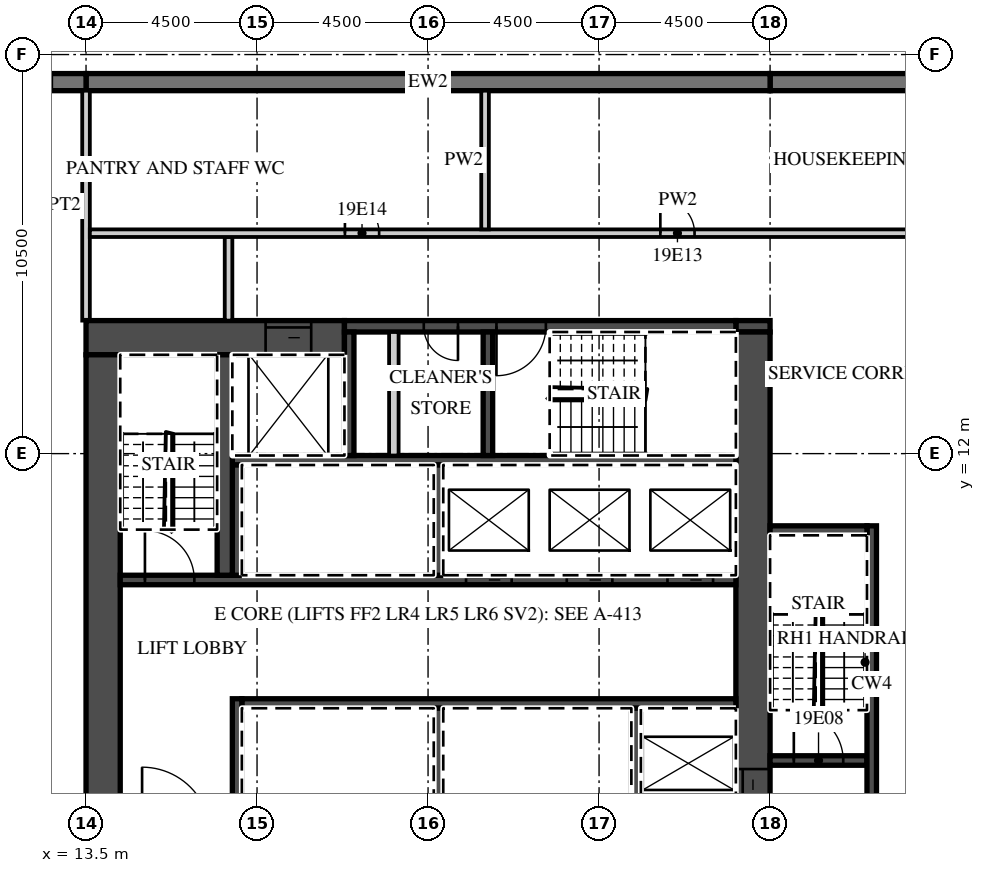
"""IFC4 building model, lengths in metres.
Left out: names, types, materials, properties, quantities, classifications, styles, units other than length and angle.
Written with IfcOpenShell. Run it as: python <this file> out.ifc"""

import sys

from ifc_helpers import new_model, si_unit, direction, frame, frame_2d, origin, place, context, subcontext, project, spatial, rectangle, extrude, element, fill, save


model = new_model("IFC4")
c1 = context("Model", 3, precision=1e-05, world=origin(), true_north=direction((0.0, 1.0)))
c2 = subcontext(c1, "Body", "Model", "MODEL_VIEW")
j1 = project(units=[si_unit("LENGTHUNIT", "METRE"), si_unit("PLANEANGLEUNIT", "RADIAN")], contexts=[c1])
p1 = place(None, origin())
s1 = spatial("IfcSite", under=j1, at=p1, CompositionType="ELEMENT")
p2 = place(p1, origin())
s2 = spatial("IfcBuilding", under=s1, at=p2, CompositionType="ELEMENT")
p3 = place(p2, frame((0.0, 0.0, 93.0)))
s3 = spatial("IfcBuildingStorey", under=s2, at=p3, CompositionType="ELEMENT", Elevation=93.0)
p4 = place(p3, frame((41.0, 21.775, 0.0), z_axis=(0.0, 0.0, 1.0), x_axis=(-1.0, 0.0, 0.0)))
e1 = element("IfcWall", 1, at=p4, inside=s3, PredefinedType="SOLIDWALL", context=c2, shape_type="SweptSolid", body=[
    extrude(rectangle(XDim=9.5, YDim=0.45, at=frame_2d((4.75, 0.0))), origin(), (0.0, 0.0, 1.0), 3.02),
])
p5 = place(p3, frame((31.5, 21.775, 0.0), z_axis=(0.0, 0.0, 1.0), x_axis=(-1.0, 0.0, 0.0)))
e2 = element("IfcWall", 2, at=p5, inside=s3, PredefinedType="SOLIDWALL", context=c2, shape_type="SweptSolid", body=[
    extrude(rectangle(XDim=18.0, YDim=0.45, at=frame_2d((9.0, 0.0))), origin(), (0.0, 0.0, 1.0), 3.02),
])
p6 = place(p3, frame((13.5, 21.775, 0.0), z_axis=(0.0, 0.0, 1.0), x_axis=(-1.0, 0.0, 0.0)))
e3 = element("IfcWall", 3, at=p6, inside=s3, PredefinedType="SOLIDWALL", context=c2, shape_type="SweptSolid", body=[
    extrude(rectangle(XDim=54.5, YDim=0.45, at=frame_2d((27.25, 0.0))), origin(), (0.0, 0.0, 1.0), 3.02),
])
p7 = place(p6, frame((0.9, 0.0, 0.45)))
e4 = element("IfcOpeningElement", 4, at=p7, cuts=e3, PredefinedType="OPENING", context=c2, shape_type="SweptSolid", body=[
    extrude(rectangle(XDim=2.7, YDim=2.25, at=frame_2d((1.35, 1.125))), frame((0.0, 0.235, 0.0), z_axis=(0.0, -1.0, 0.0), x_axis=(1.0, 0.0, 0.0)), (0.0, 0.0, 1.0), 0.47),
])
p8 = place(p6, frame((5.4, 0.0, 0.45)))
e5 = element("IfcOpeningElement", 5, at=p8, cuts=e3, PredefinedType="OPENING", context=c2, shape_type="SweptSolid", body=[
    extrude(rectangle(XDim=2.7, YDim=2.25, at=frame_2d((1.35, 1.125))), frame((0.0, 0.235, 0.0), z_axis=(0.0, -1.0, 0.0), x_axis=(1.0, 0.0, 0.0)), (0.0, 0.0, 1.0), 0.47),
])
p9 = place(p6, frame((9.9, 0.0, 0.45)))
e6 = element("IfcOpeningElement", 6, at=p9, cuts=e3, PredefinedType="OPENING", context=c2, shape_type="SweptSolid", body=[
    extrude(rectangle(XDim=2.7, YDim=2.25, at=frame_2d((1.35, 1.125))), frame((0.0, 0.235, 0.0), z_axis=(0.0, -1.0, 0.0), x_axis=(1.0, 0.0, 0.0)), (0.0, 0.0, 1.0), 0.47),
])
p10 = place(p6, frame((14.4, 0.0, 0.45)))
e7 = element("IfcOpeningElement", 7, at=p10, cuts=e3, PredefinedType="OPENING", context=c2, shape_type="SweptSolid", body=[
    extrude(rectangle(XDim=2.7, YDim=2.25, at=frame_2d((1.35, 1.125))), frame((0.0, 0.235, 0.0), z_axis=(0.0, -1.0, 0.0), x_axis=(1.0, 0.0, 0.0)), (0.0, 0.0, 1.0), 0.47),
])
p11 = place(p6, frame((18.9, 0.0, 0.45)))
e8 = element("IfcOpeningElement", 8, at=p11, cuts=e3, PredefinedType="OPENING", context=c2, shape_type="SweptSolid", body=[
    extrude(rectangle(XDim=2.7, YDim=2.25, at=frame_2d((1.35, 1.125))), frame((0.0, 0.235, 0.0), z_axis=(0.0, -1.0, 0.0), x_axis=(1.0, 0.0, 0.0)), (0.0, 0.0, 1.0), 0.47),
])
p12 = place(p6, frame((23.4, 0.0, 0.45)))
e9 = element("IfcOpeningElement", 9, at=p12, cuts=e3, PredefinedType="OPENING", context=c2, shape_type="SweptSolid", body=[
    extrude(rectangle(XDim=2.7, YDim=2.25, at=frame_2d((1.35, 1.125))), frame((0.0, 0.235, 0.0), z_axis=(0.0, -1.0, 0.0), x_axis=(1.0, 0.0, 0.0)), (0.0, 0.0, 1.0), 0.47),
])
p13 = place(p6, frame((27.9, 0.0, 0.45)))
e10 = element("IfcOpeningElement", 10, at=p13, cuts=e3, PredefinedType="OPENING", context=c2, shape_type="SweptSolid", body=[
    extrude(rectangle(XDim=2.7, YDim=2.25, at=frame_2d((1.35, 1.125))), frame((0.0, 0.235, 0.0), z_axis=(0.0, -1.0, 0.0), x_axis=(1.0, 0.0, 0.0)), (0.0, 0.0, 1.0), 0.47),
])
p14 = place(p6, frame((32.4, 0.0, 0.45)))
e11 = element("IfcOpeningElement", 11, at=p14, cuts=e3, PredefinedType="OPENING", context=c2, shape_type="SweptSolid", body=[
    extrude(rectangle(XDim=2.7, YDim=2.25, at=frame_2d((1.35, 1.125))), frame((0.0, 0.235, 0.0), z_axis=(0.0, -1.0, 0.0), x_axis=(1.0, 0.0, 0.0)), (0.0, 0.0, 1.0), 0.47),
])
p15 = place(p6, frame((36.9, 0.0, 0.45)))
e12 = element("IfcOpeningElement", 12, at=p15, cuts=e3, PredefinedType="OPENING", context=c2, shape_type="SweptSolid", body=[
    extrude(rectangle(XDim=2.7, YDim=2.25, at=frame_2d((1.35, 1.125))), frame((0.0, 0.235, 0.0), z_axis=(0.0, -1.0, 0.0), x_axis=(1.0, 0.0, 0.0)), (0.0, 0.0, 1.0), 0.47),
])
p16 = place(p6, frame((41.4, 0.0, 0.45)))
e13 = element("IfcOpeningElement", 13, at=p16, cuts=e3, PredefinedType="OPENING", context=c2, shape_type="SweptSolid", body=[
    extrude(rectangle(XDim=2.7, YDim=2.25, at=frame_2d((1.35, 1.125))), frame((0.0, 0.235, 0.0), z_axis=(0.0, -1.0, 0.0), x_axis=(1.0, 0.0, 0.0)), (0.0, 0.0, 1.0), 0.47),
])
p17 = place(p6, frame((45.9, 0.0, 0.45)))
e14 = element("IfcOpeningElement", 14, at=p17, cuts=e3, PredefinedType="OPENING", context=c2, shape_type="SweptSolid", body=[
    extrude(rectangle(XDim=2.7, YDim=2.25, at=frame_2d((1.35, 1.125))), frame((0.0, 0.235, 0.0), z_axis=(0.0, -1.0, 0.0), x_axis=(1.0, 0.0, 0.0)), (0.0, 0.0, 1.0), 0.47),
])
p18 = place(p6, frame((50.4, 0.0, 0.45)))
e15 = element("IfcOpeningElement", 15, at=p18, cuts=e3, PredefinedType="OPENING", context=c2, shape_type="SweptSolid", body=[
    extrude(rectangle(XDim=2.7, YDim=2.25, at=frame_2d((1.35, 1.125))), frame((0.0, 0.235, 0.0), z_axis=(0.0, -1.0, 0.0), x_axis=(1.0, 0.0, 0.0)), (0.0, 0.0, 1.0), 0.47),
])
p19 = place(p3, frame((13.5, 15.5, 0.0), z_axis=(0.0, 0.0, 1.0), x_axis=(0.0, 1.0, 0.0)))
e16 = element("IfcWall", 16, at=p19, inside=s3, PredefinedType="PARTITIONING", context=c2, shape_type="SweptSolid", body=[
    extrude(rectangle(XDim=6.05, YDim=0.2, at=frame_2d((3.025, 0.0))), origin(), (0.0, 0.0, 1.0), 3.02),
])
p20 = place(p3, frame((13.5, 15.05, 0.0), z_axis=(0.0, 0.0, 1.0), x_axis=(1.0, 0.0, 0.0)))
e17 = element("IfcWall", 17, at=p20, inside=s3, PredefinedType="SHEAR", context=c2, shape_type="SweptSolid", body=[
    extrude(rectangle(XDim=6.8, YDim=0.9, at=frame_2d((3.4, 0.0))), origin(), (0.0, 0.0, 1.0), 3.02),
])
p21 = place(p20, frame((4.725, 0.0, 0.0)))
e18 = element("IfcOpeningElement", 18, at=p21, cuts=e17, PredefinedType="OPENING", context=c2, shape_type="SweptSolid", body=[
    extrude(rectangle(XDim=1.2, YDim=2.1, at=frame_2d((0.6, 1.05))), frame((0.0, 0.46, 0.0), z_axis=(0.0, -1.0, 0.0), x_axis=(1.0, 0.0, 0.0)), (0.0, 0.0, 1.0), 0.92),
])
p22 = place(p3, frame((30.6, 15.35, 0.0), z_axis=(0.0, 0.0, 1.0), x_axis=(1.0, 0.0, 0.0)))
e19 = element("IfcWall", 19, at=p22, inside=s3, PredefinedType="SHEAR", context=c2, shape_type="SweptSolid", body=[
    extrude(rectangle(XDim=0.9, YDim=0.3, at=frame_2d((0.45, 0.0))), origin(), (0.0, 0.0, 1.0), 3.02),
])
p23 = place(p3, frame((20.3, 15.35, 0.0), z_axis=(0.0, 0.0, 1.0), x_axis=(1.0, 0.0, 0.0)))
e20 = element("IfcWall", 20, at=p23, inside=s3, PredefinedType="SHEAR", context=c2, shape_type="SweptSolid", body=[
    extrude(rectangle(XDim=10.3, YDim=0.3, at=frame_2d((5.15, 0.0))), origin(), (0.0, 0.0, 1.0), 3.02),
])
p24 = place(p23, frame((4.0, 0.0, 0.0)))
e21 = element("IfcOpeningElement", 21, at=p24, cuts=e20, PredefinedType="OPENING", context=c2, shape_type="SweptSolid", body=[
    extrude(rectangle(XDim=1.3, YDim=2.1, at=frame_2d((0.65, 1.05))), frame((0.0, 0.16, 0.0), z_axis=(0.0, -1.0, 0.0), x_axis=(1.0, 0.0, 0.0)), (0.0, 0.0, 1.0), 0.32),
])
p25 = place(p23, frame((2.087, 0.0, 0.0)))
e22 = element("IfcOpeningElement", 22, at=p25, cuts=e20, PredefinedType="OPENING", context=c2, shape_type="SweptSolid", body=[
    extrude(rectangle(XDim=0.9, YDim=2.1, at=frame_2d((0.45, 1.05))), frame((0.0, 0.16, 0.0), z_axis=(0.0, -1.0, 0.0), x_axis=(1.0, 0.0, 0.0)), (0.0, 0.0, 1.0), 0.32),
])
p26 = place(p3, frame((31.05, 2.4, 0.0), z_axis=(0.0, 0.0, 1.0), x_axis=(0.0, 1.0, 0.0)))
e23 = element("IfcWall", 23, at=p26, inside=s3, PredefinedType="SHEAR", context=c2, shape_type="SweptSolid", body=[
    extrude(rectangle(XDim=12.8, YDim=0.9, at=frame_2d((6.4, 0.0))), origin(), (0.0, 0.0, 1.0), 3.02),
])
p27 = place(p26, frame((0.2, 0.0, 0.0)))
e24 = element("IfcOpeningElement", 24, at=p27, cuts=e23, PredefinedType="OPENING", context=c2, shape_type="SweptSolid", body=[
    extrude(rectangle(XDim=1.1, YDim=2.1, at=frame_2d((0.55, 1.05))), frame((0.0, 0.46, 0.0), z_axis=(0.0, -1.0, 0.0), x_axis=(1.0, 0.0, 0.0)), (0.0, 0.0, 1.0), 0.92),
])
p28 = place(p3, frame((13.95, 2.4, 0.0), z_axis=(0.0, 0.0, 1.0), x_axis=(0.0, 1.0, 0.0)))
e25 = element("IfcWall", 25, at=p28, inside=s3, PredefinedType="SHEAR", context=c2, shape_type="SweptSolid", body=[
    extrude(rectangle(XDim=12.2, YDim=0.9, at=frame_2d((6.1, 0.0))), origin(), (0.0, 0.0, 1.0), 3.02),
])
p29 = place(p3, frame((17.6, 5.425, 0.0), z_axis=(0.0, 0.0, 1.0), x_axis=(1.0, 0.0, 0.0)))
e26 = element("IfcWall", 26, at=p29, inside=s3, PredefinedType="SHEAR", context=c2, shape_type="SweptSolid", body=[
    extrude(rectangle(XDim=13.0, YDim=0.25, at=frame_2d((6.5, 0.0))), origin(), (0.0, 0.0, 1.0), 3.02),
])
p30 = place(p3, frame((17.475, 2.4, 0.0), z_axis=(0.0, 0.0, 1.0), x_axis=(0.0, 1.0, 0.0)))
e27 = element("IfcWall", 27, at=p30, inside=s3, PredefinedType="SHEAR", context=c2, shape_type="SweptSolid", body=[
    extrude(rectangle(XDim=3.15, YDim=0.25, at=frame_2d((1.575, 0.0))), origin(), (0.0, 0.0, 1.0), 3.02),
])
for number, where, z_axis, x_axis in (
    (28, (27.975, 2.4, 0.0), (0.0, 0.0, 1.0), (0.0, 1.0, 0.0)),
    (29, (22.775, 2.4, 0.0), (0.0, 0.0, 1.0), (0.0, 1.0, 0.0)),
):
    element("IfcWall", number, at=place(p3, frame(where, z_axis=z_axis, x_axis=x_axis)), inside=s3, PredefinedType="SHEAR", context=c2, shape_type="SweptSolid", body=[
        extrude(rectangle(XDim=2.9, YDim=0.25, at=frame_2d((1.45, 0.0))), origin(), (0.0, 0.0, 1.0), 3.02),
    ])
p31 = place(p3, frame((14.4, 8.675, 0.0), z_axis=(0.0, 0.0, 1.0), x_axis=(1.0, 0.0, 0.0)))
e30 = element("IfcWall", 30, at=p31, inside=s3, PredefinedType="SHEAR", context=c2, shape_type="SweptSolid", body=[
    extrude(rectangle(XDim=16.2, YDim=0.25, at=frame_2d((8.1, 0.0))), origin(), (0.0, 0.0, 1.0), 3.02),
])
p32 = place(p31, frame((14.4, 0.0, 0.0)))
e31 = element("IfcOpeningElement", 31, at=p32, cuts=e30, PredefinedType="OPENING", context=c2, shape_type="SweptSolid", body=[
    extrude(rectangle(XDim=1.2, YDim=2.1, at=frame_2d((0.6, 1.05))), frame((0.0, 0.135, 0.0), z_axis=(0.0, -1.0, 0.0), x_axis=(1.0, 0.0, 0.0)), (0.0, 0.0, 1.0), 0.27),
])
p33 = place(p31, frame((11.75, 0.0, 0.0)))
e32 = element("IfcOpeningElement", 32, at=p33, cuts=e30, PredefinedType="OPENING", context=c2, shape_type="SweptSolid", body=[
    extrude(rectangle(XDim=1.2, YDim=2.1, at=frame_2d((0.6, 1.05))), frame((0.0, 0.135, 0.0), z_axis=(0.0, -1.0, 0.0), x_axis=(1.0, 0.0, 0.0)), (0.0, 0.0, 1.0), 0.27),
])
p34 = place(p31, frame((9.1, 0.0, 0.0)))
e33 = element("IfcOpeningElement", 33, at=p34, cuts=e30, PredefinedType="OPENING", context=c2, shape_type="SweptSolid", body=[
    extrude(rectangle(XDim=1.2, YDim=2.1, at=frame_2d((0.6, 1.05))), frame((0.0, 0.135, 0.0), z_axis=(0.0, -1.0, 0.0), x_axis=(1.0, 0.0, 0.0)), (0.0, 0.0, 1.0), 0.27),
])
p35 = place(p31, frame((0.65, 0.0, 0.0)))
e34 = element("IfcOpeningElement", 34, at=p35, cuts=e30, PredefinedType="OPENING", context=c2, shape_type="SweptSolid", body=[
    extrude(rectangle(XDim=1.3, YDim=2.1, at=frame_2d((0.65, 1.05))), frame((0.0, 0.135, 0.0), z_axis=(0.0, -1.0, 0.0), x_axis=(1.0, 0.0, 0.0)), (0.0, 0.0, 1.0), 0.27),
])
p36 = place(p3, frame((17.35, 11.825, 0.0), z_axis=(0.0, 0.0, 1.0), x_axis=(1.0, 0.0, 0.0)))
e35 = element("IfcWall", 35, at=p36, inside=s3, PredefinedType="SHEAR", context=c2, shape_type="SweptSolid", body=[
    extrude(rectangle(XDim=13.25, YDim=0.25, at=frame_2d((6.625, 0.0))), origin(), (0.0, 0.0, 1.0), 3.02),
])
for number, where, z_axis, x_axis in (
    (36, (17.475, 8.8, 0.0), (0.0, 0.0, 1.0), (0.0, 1.0, 0.0)),
    (37, (22.775, 8.8, 0.0), (0.0, 0.0, 1.0), (0.0, 1.0, 0.0)),
):
    element("IfcWall", number, at=place(p3, frame(where, z_axis=z_axis, x_axis=x_axis)), inside=s3, PredefinedType="SHEAR", context=c2, shape_type="SweptSolid", body=[
        extrude(rectangle(XDim=2.9, YDim=0.25, at=frame_2d((1.45, 0.0))), origin(), (0.0, 0.0, 1.0), 3.02),
    ])
p37 = place(p3, frame((17.15, 8.8, 0.0), z_axis=(0.0, 0.0, 1.0), x_axis=(0.0, 1.0, 0.0)))
e38 = element("IfcWall", 38, at=p37, inside=s3, PredefinedType="SHEAR", context=c2, shape_type="SweptSolid", body=[
    extrude(rectangle(XDim=5.8, YDim=0.4, at=frame_2d((2.9, 0.0))), origin(), (0.0, 0.0, 1.0), 3.02),
])
for number, where, z_axis, x_axis in (
    (39, (20.425, 11.95, 0.0), (0.0, 0.0, 1.0), (0.0, 1.0, 0.0)),
    (40, (24.075, 11.95, 0.0), (0.0, 0.0, 1.0), (0.0, 1.0, 0.0)),
):
    element("IfcWall", number, at=place(p3, frame(where, z_axis=z_axis, x_axis=x_axis)), inside=s3, PredefinedType="SHEAR", context=c2, shape_type="SweptSolid", body=[
        extrude(rectangle(XDim=3.25, YDim=0.25, at=frame_2d((1.625, 0.0))), origin(), (0.0, 0.0, 1.0), 3.02),
    ])
p38 = place(p3, frame((21.6, 11.95, 0.0), z_axis=(0.0, 0.0, 1.0), x_axis=(0.0, 1.0, 0.0)))
e41 = element("IfcWall", 41, at=p38, inside=s3, PredefinedType="PARTITIONING", context=c2, shape_type="SweptSolid", body=[
    extrude(rectangle(XDim=3.25, YDim=0.25, at=frame_2d((1.625, 0.0))), origin(), (0.0, 0.0, 1.0), 3.02),
])
p39 = place(p3, frame((31.5, 3.925, 0.0), z_axis=(0.0, 0.0, 1.0), x_axis=(1.0, 0.0, 0.0)))
e42 = element("IfcWall", 42, at=p39, inside=s3, PredefinedType="SHEAR", context=c2, shape_type="SweptSolid", body=[
    extrude(rectangle(XDim=2.55, YDim=0.25, at=frame_2d((1.275, 0.0))), origin(), (0.0, 0.0, 1.0), 3.02),
])
p40 = place(p39, frame((0.625, 0.0, 0.0)))
e43 = element("IfcOpeningElement", 43, at=p40, cuts=e42, PredefinedType="OPENING", context=c2, shape_type="SweptSolid", body=[
    extrude(rectangle(XDim=1.3, YDim=2.1, at=frame_2d((0.65, 1.05))), frame((0.0, 0.135, 0.0), z_axis=(0.0, -1.0, 0.0), x_axis=(1.0, 0.0, 0.0)), (0.0, 0.0, 1.0), 0.27),
])
p41 = place(p3, frame((34.175, 1.75, 0.0), z_axis=(0.0, 0.0, 1.0), x_axis=(0.0, 1.0, 0.0)))
e44 = element("IfcWall", 44, at=p41, inside=s3, PredefinedType="SHEAR", context=c2, shape_type="SweptSolid", body=[
    extrude(rectangle(XDim=8.35, YDim=0.25, at=frame_2d((4.175, 0.0))), origin(), (0.0, 0.0, 1.0), 3.02),
])
p42 = place(p3, frame((31.5, 9.975, 0.0), z_axis=(0.0, 0.0, 1.0), x_axis=(1.0, 0.0, 0.0)))
e45 = element("IfcWall", 45, at=p42, inside=s3, PredefinedType="SHEAR", context=c2, shape_type="SweptSolid", body=[
    extrude(rectangle(XDim=2.55, YDim=0.25, at=frame_2d((1.275, 0.0))), origin(), (0.0, 0.0, 1.0), 3.02),
])
p43 = place(p3, frame((17.25, 15.5, 0.0), z_axis=(0.0, 0.0, 1.0), x_axis=(0.0, 1.0, 0.0)))
e46 = element("IfcWall", 46, at=p43, inside=s3, PredefinedType="PARTITIONING", context=c2, shape_type="SweptSolid", body=[
    extrude(rectangle(XDim=2.2, YDim=0.2, at=frame_2d((1.1, 0.0))), origin(), (0.0, 0.0, 1.0), 3.02),
])
p44 = place(p3, frame((13.6, 17.8, 0.0), z_axis=(0.0, 0.0, 1.0), x_axis=(1.0, 0.0, 0.0)))
e47 = element("IfcWall", 47, at=p44, inside=s3, PredefinedType="PARTITIONING", context=c2, shape_type="SweptSolid", body=[
    extrude(rectangle(XDim=30.95, YDim=0.2, at=frame_2d((15.475, 0.0))), origin(), (0.0, 0.0, 1.0), 3.02),
])
p45 = place(p44, frame((15.012, 0.0, 0.0)))
e48 = element("IfcOpeningElement", 48, at=p45, cuts=e47, PredefinedType="OPENING", context=c2, shape_type="SweptSolid", body=[
    extrude(rectangle(XDim=0.9, YDim=2.1, at=frame_2d((0.45, 1.05))), frame((0.0, 0.11, 0.0), z_axis=(0.0, -1.0, 0.0), x_axis=(1.0, 0.0, 0.0)), (0.0, 0.0, 1.0), 0.22),
])
p46 = place(p44, frame((6.712, 0.0, 0.0)))
e49 = element("IfcOpeningElement", 49, at=p46, cuts=e47, PredefinedType="OPENING", context=c2, shape_type="SweptSolid", body=[
    extrude(rectangle(XDim=0.9, YDim=2.1, at=frame_2d((0.45, 1.05))), frame((0.0, 0.11, 0.0), z_axis=(0.0, -1.0, 0.0), x_axis=(1.0, 0.0, 0.0)), (0.0, 0.0, 1.0), 0.22),
])
p47 = place(p3, frame((24.0, 17.9, 0.0), z_axis=(0.0, 0.0, 1.0), x_axis=(0.0, 1.0, 0.0)))
e50 = element("IfcWall", 50, at=p47, inside=s3, PredefinedType="PARTITIONING", context=c2, shape_type="SweptSolid", body=[
    extrude(rectangle(XDim=3.65, YDim=0.2, at=frame_2d((1.825, 0.0))), origin(), (0.0, 0.0, 1.0), 3.02),
])
p48 = place(p32, origin())
e51 = element("IfcDoor", 51, at=p48, inside=s3, OperationType="SLIDING_TO_LEFT", PredefinedType="DOOR", context=c2, shape_type="SweptSolid", body=[
    extrude(rectangle(XDim=1.2, YDim=2.1, at=frame_2d((0.6, 1.05))), frame((0.0, 0.025, 0.0), z_axis=(0.0, -1.0, 0.0), x_axis=(1.0, 0.0, 0.0)), (0.0, 0.0, 1.0), 0.05),
])
fill(e31, e51)
p49 = place(p33, origin())
e52 = element("IfcDoor", 52, at=p49, inside=s3, OperationType="SLIDING_TO_RIGHT", PredefinedType="DOOR", context=c2, shape_type="SweptSolid", body=[
    extrude(rectangle(XDim=1.2, YDim=2.1, at=frame_2d((0.6, 1.05))), frame((0.0, 0.025, 0.0), z_axis=(0.0, -1.0, 0.0), x_axis=(1.0, 0.0, 0.0)), (0.0, 0.0, 1.0), 0.05),
])
fill(e32, e52)
p50 = place(p34, origin())
e53 = element("IfcDoor", 53, at=p50, inside=s3, OperationType="SLIDING_TO_RIGHT", PredefinedType="DOOR", context=c2, shape_type="SweptSolid", body=[
    extrude(rectangle(XDim=1.2, YDim=2.1, at=frame_2d((0.6, 1.05))), frame((0.0, 0.025, 0.0), z_axis=(0.0, -1.0, 0.0), x_axis=(1.0, 0.0, 0.0)), (0.0, 0.0, 1.0), 0.05),
])
fill(e33, e53)
p51 = place(p21, origin())
e54 = element("IfcDoor", 54, at=p51, inside=s3, OperationType="SLIDING_TO_LEFT", PredefinedType="DOOR", context=c2, shape_type="SweptSolid", body=[
    extrude(rectangle(XDim=1.2, YDim=2.1, at=frame_2d((0.6, 1.05))), frame((0.0, 0.025, 0.0), z_axis=(0.0, -1.0, 0.0), x_axis=(1.0, 0.0, 0.0)), (0.0, 0.0, 1.0), 0.05),
])
fill(e18, e54)
p52 = place(p27, origin())
e55 = element("IfcDoor", 55, at=p52, inside=s3, OperationType="SLIDING_TO_LEFT", PredefinedType="DOOR", context=c2, shape_type="SweptSolid", body=[
    extrude(rectangle(XDim=1.1, YDim=2.1, at=frame_2d((0.55, 1.05))), frame((0.0, 0.025, 0.0), z_axis=(0.0, -1.0, 0.0), x_axis=(1.0, 0.0, 0.0)), (0.0, 0.0, 1.0), 0.05),
])
fill(e24, e55)
p53 = place(p40, origin())
e56 = element("IfcDoor", 56, at=p53, inside=s3, OperationType="SINGLE_SWING_LEFT", PredefinedType="DOOR", context=c2, shape_type="SweptSolid", body=[
    extrude(rectangle(XDim=1.3, YDim=2.1, at=frame_2d((0.65, 1.05))), frame((0.0, 0.025, 0.0), z_axis=(0.0, -1.0, 0.0), x_axis=(1.0, 0.0, 0.0)), (0.0, 0.0, 1.0), 0.05),
])
fill(e43, e56)
p54 = place(p35, origin())
e57 = element("IfcDoor", 57, at=p54, inside=s3, OperationType="SINGLE_SWING_LEFT", PredefinedType="DOOR", context=c2, shape_type="SweptSolid", body=[
    extrude(rectangle(XDim=1.3, YDim=2.1, at=frame_2d((0.65, 1.05))), frame((0.0, 0.025, 0.0), z_axis=(0.0, -1.0, 0.0), x_axis=(1.0, 0.0, 0.0)), (0.0, 0.0, 1.0), 0.05),
])
fill(e34, e57)
p55 = place(p24, origin())
e58 = element("IfcDoor", 58, at=p55, inside=s3, OperationType="SINGLE_SWING_LEFT", PredefinedType="DOOR", context=c2, shape_type="SweptSolid", body=[
    extrude(rectangle(XDim=1.3, YDim=2.1, at=frame_2d((0.65, 1.05))), frame((0.0, 0.025, 0.0), z_axis=(0.0, -1.0, 0.0), x_axis=(1.0, 0.0, 0.0)), (0.0, 0.0, 1.0), 0.05),
])
fill(e21, e58)
p56 = place(p25, origin())
e59 = element("IfcDoor", 59, at=p56, inside=s3, OperationType="SINGLE_SWING_RIGHT", PredefinedType="DOOR", context=c2, shape_type="SweptSolid", body=[
    extrude(rectangle(XDim=0.9, YDim=2.1, at=frame_2d((0.45, 1.05))), frame((0.0, 0.025, 0.0), z_axis=(0.0, -1.0, 0.0), x_axis=(1.0, 0.0, 0.0)), (0.0, 0.0, 1.0), 0.05),
])
fill(e22, e59)
p57 = place(p45, origin())
e60 = element("IfcDoor", 60, at=p57, inside=s3, OperationType="SINGLE_SWING_LEFT", PredefinedType="DOOR", context=c2, shape_type="SweptSolid", body=[
    extrude(rectangle(XDim=0.9, YDim=2.1, at=frame_2d((0.45, 1.05))), frame((0.0, 0.025, 0.0), z_axis=(0.0, -1.0, 0.0), x_axis=(1.0, 0.0, 0.0)), (0.0, 0.0, 1.0), 0.05),
])
fill(e48, e60)
p58 = place(p46, origin())
e61 = element("IfcDoor", 61, at=p58, inside=s3, OperationType="SINGLE_SWING_LEFT", PredefinedType="DOOR", context=c2, shape_type="SweptSolid", body=[
    extrude(rectangle(XDim=0.9, YDim=2.1, at=frame_2d((0.45, 1.05))), frame((0.0, 0.025, 0.0), z_axis=(0.0, -1.0, 0.0), x_axis=(1.0, 0.0, 0.0)), (0.0, 0.0, 1.0), 0.05),
])
fill(e49, e61)
save(model, sys.argv[1])
